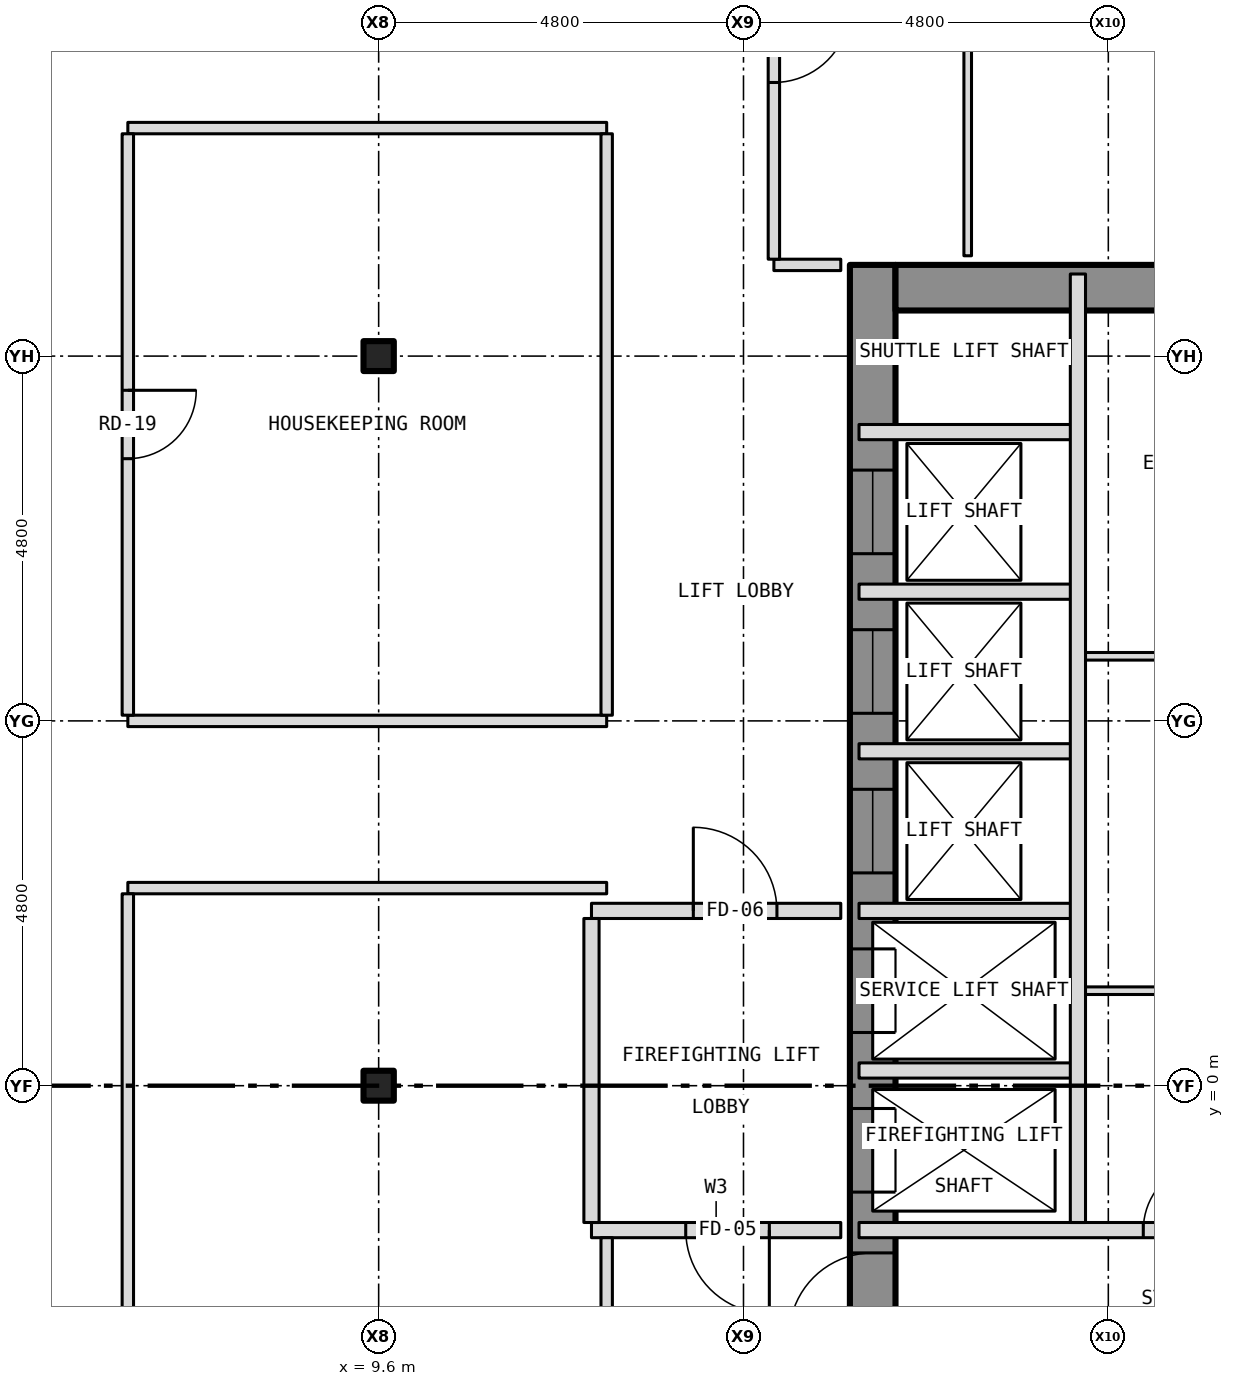
"""IFC4 building model, lengths in metres.
Left out: names, types, materials, properties, quantities, classifications, styles, units other than length and angle.
Written with IfcOpenShell. Run it as: python <this file> out.ifc"""

import sys

from ifc_helpers import new_model, si_unit, direction, frame, frame_2d, origin, origin_2d, place, context, subcontext, project, spatial, rectangle, i_section, extrude, element, fill, save


model = new_model("IFC4")
c1 = context("Model", 3, precision=1e-05, world=origin(), true_north=direction((0.0, 1.0)))
c2 = subcontext(c1, "Body", "Model", "MODEL_VIEW")
j1 = project(units=[si_unit("LENGTHUNIT", "METRE"), si_unit("PLANEANGLEUNIT", "RADIAN")], contexts=[c1])
p1 = place(None, origin())
s1 = spatial("IfcSite", under=j1, at=p1, CompositionType="ELEMENT")
p2 = place(p1, origin())
s2 = spatial("IfcBuilding", under=s1, at=p2, CompositionType="ELEMENT")
p3 = place(p2, frame((0.0, 0.0, 113.5)))
s3 = spatial("IfcBuildingStorey", under=s2, at=p3, CompositionType="ELEMENT", Elevation=113.5)
for number, where, z_axis, x_axis in (
    (1, (9.6, 0.0, -0.15), (0.0, 0.0, 1.0), (1.0, 0.0, 0.0)),
    (2, (9.6, 9.6, -0.15), (0.0, 0.0, 1.0), (1.0, 0.0, 0.0)),
):
    element("IfcColumn", number, at=place(p3, frame(where, z_axis=z_axis, x_axis=x_axis)), inside=s3, PredefinedType="COLUMN", context=c2, shape_type="SweptSolid", body=[
        extrude(i_section(OverallWidth=0.399, OverallDepth=0.394, WebThickness=0.023, FlangeThickness=0.037, at=origin_2d()), origin(), (0.0, 0.0, 1.0), 3.5),
    ])
p4 = place(p3, frame((16.1, -10.8, 0.0), z_axis=(0.0, 0.0, 1.0), x_axis=(0.0, 1.0, 0.0)))
e3 = element("IfcWall", 3, at=p4, inside=s3, PredefinedType="SHEAR", context=c2, shape_type="SweptSolid", body=[
    extrude(rectangle(XDim=21.6, YDim=0.6, at=frame_2d((10.8, 0.0))), origin(), (0.0, 0.0, 1.0), 3.25),
])
p5 = place(p4, frame((9.4, 0.0, 0.0)))
e4 = element("IfcOpeningElement", 4, at=p5, cuts=e3, PredefinedType="OPENING", context=c2, shape_type="SweptSolid", body=[
    extrude(rectangle(XDim=1.1, YDim=2.1, at=frame_2d((0.55, 1.05))), frame((0.0, 0.312, 0.0), z_axis=(0.0, -1.0, 0.0), x_axis=(1.0, 0.0, 0.0)), (0.0, 0.0, 1.0), 0.624),
])
p6 = place(p4, frame((11.5, 0.0, 0.0)))
e5 = element("IfcOpeningElement", 5, at=p6, cuts=e3, PredefinedType="OPENING", context=c2, shape_type="SweptSolid", body=[
    extrude(rectangle(XDim=1.1, YDim=2.1, at=frame_2d((0.55, 1.05))), frame((0.0, 0.312, 0.0), z_axis=(0.0, -1.0, 0.0), x_axis=(1.0, 0.0, 0.0)), (0.0, 0.0, 1.0), 0.624),
])
p7 = place(p4, frame((13.6, 0.0, 0.0)))
e6 = element("IfcOpeningElement", 6, at=p7, cuts=e3, PredefinedType="OPENING", context=c2, shape_type="SweptSolid", body=[
    extrude(rectangle(XDim=1.1, YDim=2.1, at=frame_2d((0.55, 1.05))), frame((0.0, 0.312, 0.0), z_axis=(0.0, -1.0, 0.0), x_axis=(1.0, 0.0, 0.0)), (0.0, 0.0, 1.0), 0.624),
])
p8 = place(p4, frame((15.7, 0.0, 0.0)))
e7 = element("IfcOpeningElement", 7, at=p8, cuts=e3, PredefinedType="OPENING", context=c2, shape_type="SweptSolid", body=[
    extrude(rectangle(XDim=1.1, YDim=2.1, at=frame_2d((0.55, 1.05))), frame((0.0, 0.312, 0.0), z_axis=(0.0, -1.0, 0.0), x_axis=(1.0, 0.0, 0.0)), (0.0, 0.0, 1.0), 0.624),
])
p9 = place(p4, frame((17.8, 0.0, 0.0)))
e8 = element("IfcOpeningElement", 8, at=p9, cuts=e3, PredefinedType="OPENING", context=c2, shape_type="SweptSolid", body=[
    extrude(rectangle(XDim=1.1, YDim=2.1, at=frame_2d((0.55, 1.05))), frame((0.0, 0.312, 0.0), z_axis=(0.0, -1.0, 0.0), x_axis=(1.0, 0.0, 0.0)), (0.0, 0.0, 1.0), 0.624),
])
p10 = place(p4, frame((5.642, 0.0, 0.0)))
e9 = element("IfcOpeningElement", 9, at=p10, cuts=e3, PredefinedType="OPENING", context=c2, shape_type="SweptSolid", body=[
    extrude(rectangle(XDim=1.1, YDim=2.1, at=frame_2d((0.55, 1.05))), frame((0.0, 0.312, 0.0), z_axis=(0.0, -1.0, 0.0), x_axis=(1.0, 0.0, 0.0)), (0.0, 0.0, 1.0), 0.624),
])
p11 = place(p4, frame((7.5, 0.0, 0.0)))
e10 = element("IfcOpeningElement", 10, at=p11, cuts=e3, PredefinedType="OPENING", context=c2, shape_type="SweptSolid", body=[
    extrude(rectangle(XDim=1.1, YDim=2.1, at=frame_2d((0.55, 1.05))), frame((0.0, 0.312, 0.0), z_axis=(0.0, -1.0, 0.0), x_axis=(1.0, 0.0, 0.0)), (0.0, 0.0, 1.0), 0.624),
])
p12 = place(p3, frame((16.4, 10.5, 0.0), z_axis=(0.0, 0.0, 1.0), x_axis=(1.0, 0.0, 0.0)))
e11 = element("IfcWall", 11, at=p12, inside=s3, PredefinedType="SHEAR", context=c2, shape_type="SweptSolid", body=[
    extrude(rectangle(XDim=5.8, YDim=0.6, at=frame_2d((2.9, 0.0))), origin(), (0.0, 0.0, 1.0), 3.25),
])
p13 = place(p3, frame((12.4, -1.9, 0.0), z_axis=(0.0, 0.0, 1.0), x_axis=(1.0, 0.0, 0.0)))
e12 = element("IfcWall", 12, at=p13, inside=s3, PredefinedType="PARTITIONING", context=c2, shape_type="SweptSolid", body=[
    extrude(rectangle(XDim=3.28, YDim=0.2, at=frame_2d((1.64, 0.0))), origin(), (0.0, 0.0, 1.0), 3.35),
])
p14 = place(p13, frame((1.24, 0.0, 0.0)))
e13 = element("IfcOpeningElement", 13, at=p14, cuts=e12, PredefinedType="OPENING", context=c2, shape_type="SweptSolid", body=[
    extrude(rectangle(XDim=1.1, YDim=2.1, at=frame_2d((0.55, 1.05))), frame((0.0, 0.112, 0.0), z_axis=(0.0, -1.0, 0.0), x_axis=(1.0, 0.0, 0.0)), (0.0, 0.0, 1.0), 0.224),
])
p15 = place(p3, frame((15.92, -1.9, 0.0), z_axis=(0.0, 0.0, 1.0), x_axis=(1.0, 0.0, 0.0)))
e14 = element("IfcWall", 14, at=p15, inside=s3, PredefinedType="PARTITIONING", context=c2, shape_type="SweptSolid", body=[
    extrude(rectangle(XDim=6.76, YDim=0.2, at=frame_2d((3.38, 0.0))), origin(), (0.0, 0.0, 1.0), 3.25),
])
p16 = place(p15, frame((3.74, 0.0, 0.0)))
e15 = element("IfcOpeningElement", 15, at=p16, cuts=e14, PredefinedType="OPENING", context=c2, shape_type="SweptSolid", body=[
    extrude(rectangle(XDim=0.9, YDim=2.1, at=frame_2d((0.45, 1.05))), frame((0.0, 0.112, 0.0), z_axis=(0.0, -1.0, 0.0), x_axis=(1.0, 0.0, 0.0)), (0.0, 0.0, 1.0), 0.224),
])
p17 = place(p3, frame((15.92, 0.2, 0.0), z_axis=(0.0, 0.0, 1.0), x_axis=(1.0, 0.0, 0.0)))
e16 = element("IfcWall", 16, at=p17, inside=s3, PredefinedType="PARTITIONING", context=c2, shape_type="SweptSolid", body=[
    extrude(rectangle(XDim=2.88, YDim=0.2, at=frame_2d((1.44, 0.0))), origin(), (0.0, 0.0, 1.0), 3.25),
])
p18 = place(p3, frame((18.8, 1.25, 0.0), z_axis=(0.0, 0.0, 1.0), x_axis=(1.0, 0.0, 0.0)))
e17 = element("IfcWall", 17, at=p18, inside=s3, PredefinedType="PARTITIONING", context=c2, shape_type="SweptSolid", body=[
    extrude(rectangle(XDim=3.88, YDim=0.1, at=frame_2d((1.94, 0.0))), origin(), (0.0, 0.0, 1.0), 3.25),
])
p19 = place(p18, frame((1.55, 0.0, 0.0)))
e18 = element("IfcOpeningElement", 18, at=p19, cuts=e17, PredefinedType="OPENING", context=c2, shape_type="SweptSolid", body=[
    extrude(rectangle(XDim=0.9, YDim=2.1, at=frame_2d((0.45, 1.05))), frame((0.0, 0.062, 0.0), z_axis=(0.0, -1.0, 0.0), x_axis=(1.0, 0.0, 0.0)), (0.0, 0.0, 1.0), 0.124),
])
p20 = place(p3, frame((12.4, 2.3, 0.0), z_axis=(0.0, 0.0, 1.0), x_axis=(1.0, 0.0, 0.0)))
e19 = element("IfcWall", 19, at=p20, inside=s3, PredefinedType="PARTITIONING", context=c2, shape_type="SweptSolid", body=[
    extrude(rectangle(XDim=3.28, YDim=0.2, at=frame_2d((1.64, 0.0))), origin(), (0.0, 0.0, 1.0), 3.35),
])
p21 = place(p20, frame((1.34, 0.0, 0.0)))
e20 = element("IfcOpeningElement", 20, at=p21, cuts=e19, PredefinedType="OPENING", context=c2, shape_type="SweptSolid", body=[
    extrude(rectangle(XDim=1.1, YDim=2.1, at=frame_2d((0.55, 1.05))), frame((0.0, 0.112, 0.0), z_axis=(0.0, -1.0, 0.0), x_axis=(1.0, 0.0, 0.0)), (0.0, 0.0, 1.0), 0.224),
])
p22 = place(p3, frame((15.92, 2.3, 0.0), z_axis=(0.0, 0.0, 1.0), x_axis=(1.0, 0.0, 0.0)))
e21 = element("IfcWall", 21, at=p22, inside=s3, PredefinedType="PARTITIONING", context=c2, shape_type="SweptSolid", body=[
    extrude(rectangle(XDim=2.88, YDim=0.2, at=frame_2d((1.44, 0.0))), origin(), (0.0, 0.0, 1.0), 3.25),
])
p23 = place(p3, frame((6.3, 2.6, 0.0), z_axis=(0.0, 0.0, 1.0), x_axis=(1.0, 0.0, 0.0)))
e22 = element("IfcWall", 22, at=p23, inside=s3, PredefinedType="PARTITIONING", context=c2, shape_type="SweptSolid", body=[
    extrude(rectangle(XDim=6.3, YDim=0.15, at=frame_2d((3.15, 0.0))), origin(), (0.0, 0.0, 1.0), 3.35),
])
p24 = place(p3, frame((15.92, 4.4, 0.0), z_axis=(0.0, 0.0, 1.0), x_axis=(1.0, 0.0, 0.0)))
e23 = element("IfcWall", 23, at=p24, inside=s3, PredefinedType="PARTITIONING", context=c2, shape_type="SweptSolid", body=[
    extrude(rectangle(XDim=2.88, YDim=0.2, at=frame_2d((1.44, 0.0))), origin(), (0.0, 0.0, 1.0), 3.25),
])
p25 = place(p3, frame((6.3, 4.8, 0.0), z_axis=(0.0, 0.0, 1.0), x_axis=(1.0, 0.0, 0.0)))
e24 = element("IfcWall", 24, at=p25, inside=s3, PredefinedType="PARTITIONING", context=c2, shape_type="SweptSolid", body=[
    extrude(rectangle(XDim=6.3, YDim=0.15, at=frame_2d((3.15, 0.0))), origin(), (0.0, 0.0, 1.0), 3.35),
])
p26 = place(p3, frame((18.8, 5.65, 0.0), z_axis=(0.0, 0.0, 1.0), x_axis=(1.0, 0.0, 0.0)))
e25 = element("IfcWall", 25, at=p26, inside=s3, PredefinedType="PARTITIONING", context=c2, shape_type="SweptSolid", body=[
    extrude(rectangle(XDim=3.88, YDim=0.1, at=frame_2d((1.94, 0.0))), origin(), (0.0, 0.0, 1.0), 3.25),
])
p27 = place(p26, frame((1.55, 0.0, 0.0)))
e26 = element("IfcOpeningElement", 26, at=p27, cuts=e25, PredefinedType="OPENING", context=c2, shape_type="SweptSolid", body=[
    extrude(rectangle(XDim=0.9, YDim=2.1, at=frame_2d((0.45, 1.05))), frame((0.0, 0.062, 0.0), z_axis=(0.0, -1.0, 0.0), x_axis=(1.0, 0.0, 0.0)), (0.0, 0.0, 1.0), 0.124),
])
for number, where, z_axis, x_axis in (
    (27, (15.92, 6.5, 0.0), (0.0, 0.0, 1.0), (1.0, 0.0, 0.0)),
    (28, (15.92, 8.6, 0.0), (0.0, 0.0, 1.0), (1.0, 0.0, 0.0)),
):
    element("IfcWall", number, at=place(p3, frame(where, z_axis=z_axis, x_axis=x_axis)), inside=s3, PredefinedType="PARTITIONING", context=c2, shape_type="SweptSolid", body=[
        extrude(rectangle(XDim=2.88, YDim=0.2, at=frame_2d((1.44, 0.0))), origin(), (0.0, 0.0, 1.0), 3.25),
    ])
p28 = place(p3, frame((14.8, 10.8, 0.0), z_axis=(0.0, 0.0, 1.0), x_axis=(1.0, 0.0, 0.0)))
e29 = element("IfcWall", 29, at=p28, inside=s3, PredefinedType="PARTITIONING", context=c2, shape_type="SweptSolid", body=[
    extrude(rectangle(XDim=0.88, YDim=0.15, at=frame_2d((0.44, 0.0))), origin(), (0.0, 0.0, 1.0), 3.35),
])
p29 = place(p3, frame((6.3, 12.6, 0.0), z_axis=(0.0, 0.0, 1.0), x_axis=(1.0, 0.0, 0.0)))
e30 = element("IfcWall", 30, at=p29, inside=s3, PredefinedType="PARTITIONING", context=c2, shape_type="SweptSolid", body=[
    extrude(rectangle(XDim=6.3, YDim=0.15, at=frame_2d((3.15, 0.0))), origin(), (0.0, 0.0, 1.0), 3.35),
])
p30 = place(p3, frame((6.3, -12.525, 0.0), z_axis=(0.0, 0.0, 1.0), x_axis=(0.0, 1.0, 0.0)))
e31 = element("IfcWall", 31, at=p30, inside=s3, PredefinedType="PARTITIONING", context=c2, shape_type="SweptSolid", body=[
    extrude(rectangle(XDim=15.05, YDim=0.15, at=frame_2d((7.525, 0.0))), origin(), (0.0, 0.0, 1.0), 3.35),
])
p31 = place(p30, frame((7.075, 0.0, 0.0)))
e32 = element("IfcOpeningElement", 32, at=p31, cuts=e31, PredefinedType="OPENING", context=c2, shape_type="SweptSolid", body=[
    extrude(rectangle(XDim=0.9, YDim=2.1, at=frame_2d((0.45, 1.05))), frame((0.0, 0.087, 0.0), z_axis=(0.0, -1.0, 0.0), x_axis=(1.0, 0.0, 0.0)), (0.0, 0.0, 1.0), 0.174),
])
p32 = place(p3, frame((6.3, 4.875, 0.0), z_axis=(0.0, 0.0, 1.0), x_axis=(0.0, 1.0, 0.0)))
e33 = element("IfcWall", 33, at=p32, inside=s3, PredefinedType="PARTITIONING", context=c2, shape_type="SweptSolid", body=[
    extrude(rectangle(XDim=7.65, YDim=0.15, at=frame_2d((3.825, 0.0))), origin(), (0.0, 0.0, 1.0), 3.35),
])
p33 = place(p32, frame((3.375, 0.0, 0.0)))
e34 = element("IfcOpeningElement", 34, at=p33, cuts=e33, PredefinedType="OPENING", context=c2, shape_type="SweptSolid", body=[
    extrude(rectangle(XDim=0.9, YDim=2.1, at=frame_2d((0.45, 1.05))), frame((0.0, 0.087, 0.0), z_axis=(0.0, -1.0, 0.0), x_axis=(1.0, 0.0, 0.0)), (0.0, 0.0, 1.0), 0.174),
])
p34 = place(p3, frame((12.4, -1.8, 0.0), z_axis=(0.0, 0.0, 1.0), x_axis=(0.0, 1.0, 0.0)))
e35 = element("IfcWall", 35, at=p34, inside=s3, PredefinedType="PARTITIONING", context=c2, shape_type="SweptSolid", body=[
    extrude(rectangle(XDim=4.0, YDim=0.2, at=frame_2d((2.0, 0.0))), origin(), (0.0, 0.0, 1.0), 3.35),
])
p35 = place(p3, frame((12.6, -12.525, 0.0), z_axis=(0.0, 0.0, 1.0), x_axis=(0.0, 1.0, 0.0)))
e36 = element("IfcWall", 36, at=p35, inside=s3, PredefinedType="PARTITIONING", context=c2, shape_type="SweptSolid", body=[
    extrude(rectangle(XDim=10.525, YDim=0.15, at=frame_2d((5.262, 0.0))), origin(), (0.0, 0.0, 1.0), 3.35),
])
p36 = place(p3, frame((12.6, 4.875, 0.0), z_axis=(0.0, 0.0, 1.0), x_axis=(0.0, 1.0, 0.0)))
e37 = element("IfcWall", 37, at=p36, inside=s3, PredefinedType="PARTITIONING", context=c2, shape_type="SweptSolid", body=[
    extrude(rectangle(XDim=7.65, YDim=0.15, at=frame_2d((3.825, 0.0))), origin(), (0.0, 0.0, 1.0), 3.35),
])
p37 = place(p3, frame((14.8, 10.875, 0.0), z_axis=(0.0, 0.0, 1.0), x_axis=(0.0, 1.0, 0.0)))
e38 = element("IfcWall", 38, at=p37, inside=s3, PredefinedType="PARTITIONING", context=c2, shape_type="SweptSolid", body=[
    extrude(rectangle(XDim=3.85, YDim=0.15, at=frame_2d((1.925, 0.0))), origin(), (0.0, 0.0, 1.0), 3.35),
])
p38 = place(p37, frame((2.325, 0.0, 0.0)))
e39 = element("IfcOpeningElement", 39, at=p38, cuts=e38, PredefinedType="OPENING", context=c2, shape_type="SweptSolid", body=[
    extrude(rectangle(XDim=1.0, YDim=2.1, at=frame_2d((0.5, 1.05))), frame((0.0, 0.087, 0.0), z_axis=(0.0, -1.0, 0.0), x_axis=(1.0, 0.0, 0.0)), (0.0, 0.0, 1.0), 0.174),
])
p39 = place(p3, frame((17.35, 10.92, 0.0), z_axis=(0.0, 0.0, 1.0), x_axis=(0.0, 1.0, 0.0)))
e40 = element("IfcWall", 40, at=p39, inside=s3, PredefinedType="PARTITIONING", context=c2, shape_type="SweptSolid", body=[
    extrude(rectangle(XDim=12.36, YDim=0.1, at=frame_2d((6.18, 0.0))), origin(), (0.0, 0.0, 1.0), 3.35),
])
p40 = place(p39, frame((5.43, 0.0, 0.0)))
e41 = element("IfcOpeningElement", 41, at=p40, cuts=e40, PredefinedType="OPENING", context=c2, shape_type="SweptSolid", body=[
    extrude(rectangle(XDim=0.9, YDim=2.1, at=frame_2d((0.45, 1.05))), frame((0.0, 0.062, 0.0), z_axis=(0.0, -1.0, 0.0), x_axis=(1.0, 0.0, 0.0)), (0.0, 0.0, 1.0), 0.124),
])
p41 = place(p3, frame((18.8, -1.8, 0.0), z_axis=(0.0, 0.0, 1.0), x_axis=(0.0, 1.0, 0.0)))
e42 = element("IfcWall", 42, at=p41, inside=s3, PredefinedType="PARTITIONING", context=c2, shape_type="SweptSolid", body=[
    extrude(rectangle(XDim=12.48, YDim=0.2, at=frame_2d((6.24, 0.0))), origin(), (0.0, 0.0, 1.0), 3.25),
])
p42 = place(p5, origin())
e43 = element("IfcDoor", 43, at=p42, inside=s3, OperationType="SLIDING_TO_LEFT", PredefinedType="DOOR", context=c2, shape_type="SweptSolid", body=[
    extrude(rectangle(XDim=1.1, YDim=2.1, at=frame_2d((0.55, 1.05))), frame((0.0, 0.025, 0.0), z_axis=(0.0, -1.0, 0.0), x_axis=(1.0, 0.0, 0.0)), (0.0, 0.0, 1.0), 0.05),
])
fill(e4, e43)
p43 = place(p6, origin())
e44 = element("IfcDoor", 44, at=p43, inside=s3, OperationType="SLIDING_TO_LEFT", PredefinedType="DOOR", context=c2, shape_type="SweptSolid", body=[
    extrude(rectangle(XDim=1.1, YDim=2.1, at=frame_2d((0.55, 1.05))), frame((0.0, 0.025, 0.0), z_axis=(0.0, -1.0, 0.0), x_axis=(1.0, 0.0, 0.0)), (0.0, 0.0, 1.0), 0.05),
])
fill(e5, e44)
p44 = place(p7, origin())
e45 = element("IfcDoor", 45, at=p44, inside=s3, OperationType="SLIDING_TO_LEFT", PredefinedType="DOOR", context=c2, shape_type="SweptSolid", body=[
    extrude(rectangle(XDim=1.1, YDim=2.1, at=frame_2d((0.55, 1.05))), frame((0.0, 0.025, 0.0), z_axis=(0.0, -1.0, 0.0), x_axis=(1.0, 0.0, 0.0)), (0.0, 0.0, 1.0), 0.05),
])
fill(e6, e45)
p45 = place(p8, origin())
e46 = element("IfcDoor", 46, at=p45, inside=s3, OperationType="SLIDING_TO_LEFT", PredefinedType="DOOR", context=c2, shape_type="SweptSolid", body=[
    extrude(rectangle(XDim=1.1, YDim=2.1, at=frame_2d((0.55, 1.05))), frame((0.0, 0.025, 0.0), z_axis=(0.0, -1.0, 0.0), x_axis=(1.0, 0.0, 0.0)), (0.0, 0.0, 1.0), 0.05),
])
fill(e7, e46)
p46 = place(p9, origin())
e47 = element("IfcDoor", 47, at=p46, inside=s3, OperationType="SLIDING_TO_LEFT", PredefinedType="DOOR", context=c2, shape_type="SweptSolid", body=[
    extrude(rectangle(XDim=1.1, YDim=2.1, at=frame_2d((0.55, 1.05))), frame((0.0, 0.025, 0.0), z_axis=(0.0, -1.0, 0.0), x_axis=(1.0, 0.0, 0.0)), (0.0, 0.0, 1.0), 0.05),
])
fill(e8, e47)
p47 = place(p11, origin())
e48 = element("IfcDoor", 48, at=p47, inside=s3, OperationType="SINGLE_SWING_LEFT", PredefinedType="DOOR", context=c2, shape_type="SweptSolid", body=[
    extrude(rectangle(XDim=1.1, YDim=2.1, at=frame_2d((0.55, 1.05))), frame((0.0, 0.025, 0.0), z_axis=(0.0, -1.0, 0.0), x_axis=(1.0, 0.0, 0.0)), (0.0, 0.0, 1.0), 0.05),
])
fill(e10, e48)
p48 = place(p16, origin())
e49 = element("IfcDoor", 49, at=p48, inside=s3, OperationType="SINGLE_SWING_RIGHT", PredefinedType="DOOR", context=c2, shape_type="SweptSolid", body=[
    extrude(rectangle(XDim=0.9, YDim=2.1, at=frame_2d((0.45, 1.05))), frame((0.0, 0.025, 0.0), z_axis=(0.0, -1.0, 0.0), x_axis=(1.0, 0.0, 0.0)), (0.0, 0.0, 1.0), 0.05),
])
fill(e15, e49)
p49 = place(p14, origin())
e50 = element("IfcDoor", 50, at=p49, inside=s3, OperationType="SINGLE_SWING_RIGHT", PredefinedType="DOOR", context=c2, shape_type="SweptSolid", body=[
    extrude(rectangle(XDim=1.1, YDim=2.1, at=frame_2d((0.55, 1.05))), frame((0.0, 0.025, 0.0), z_axis=(0.0, -1.0, 0.0), x_axis=(1.0, 0.0, 0.0)), (0.0, 0.0, 1.0), 0.05),
])
fill(e13, e50)
p50 = place(p21, origin())
e51 = element("IfcDoor", 51, at=p50, inside=s3, OperationType="SINGLE_SWING_LEFT", PredefinedType="DOOR", context=c2, shape_type="SweptSolid", body=[
    extrude(rectangle(XDim=1.1, YDim=2.1, at=frame_2d((0.55, 1.05))), frame((0.0, 0.025, 0.0), z_axis=(0.0, -1.0, 0.0), x_axis=(1.0, 0.0, 0.0)), (0.0, 0.0, 1.0), 0.05),
])
fill(e20, e51)
p51 = place(p38, origin())
e52 = element("IfcDoor", 52, at=p51, inside=s3, OperationType="SINGLE_SWING_RIGHT", PredefinedType="DOOR", context=c2, shape_type="SweptSolid", body=[
    extrude(rectangle(XDim=1.0, YDim=2.1, at=frame_2d((0.5, 1.05))), frame((0.0, 0.025, 0.0), z_axis=(0.0, -1.0, 0.0), x_axis=(1.0, 0.0, 0.0)), (0.0, 0.0, 1.0), 0.05),
])
fill(e39, e52)
p52 = place(p33, origin())
e53 = element("IfcDoor", 53, at=p52, inside=s3, OperationType="SINGLE_SWING_RIGHT", PredefinedType="DOOR", context=c2, shape_type="SweptSolid", body=[
    extrude(rectangle(XDim=0.9, YDim=2.1, at=frame_2d((0.45, 1.05))), frame((0.0, 0.025, 0.0), z_axis=(0.0, -1.0, 0.0), x_axis=(1.0, 0.0, 0.0)), (0.0, 0.0, 1.0), 0.05),
])
fill(e34, e53)
save(model, sys.argv[1])
